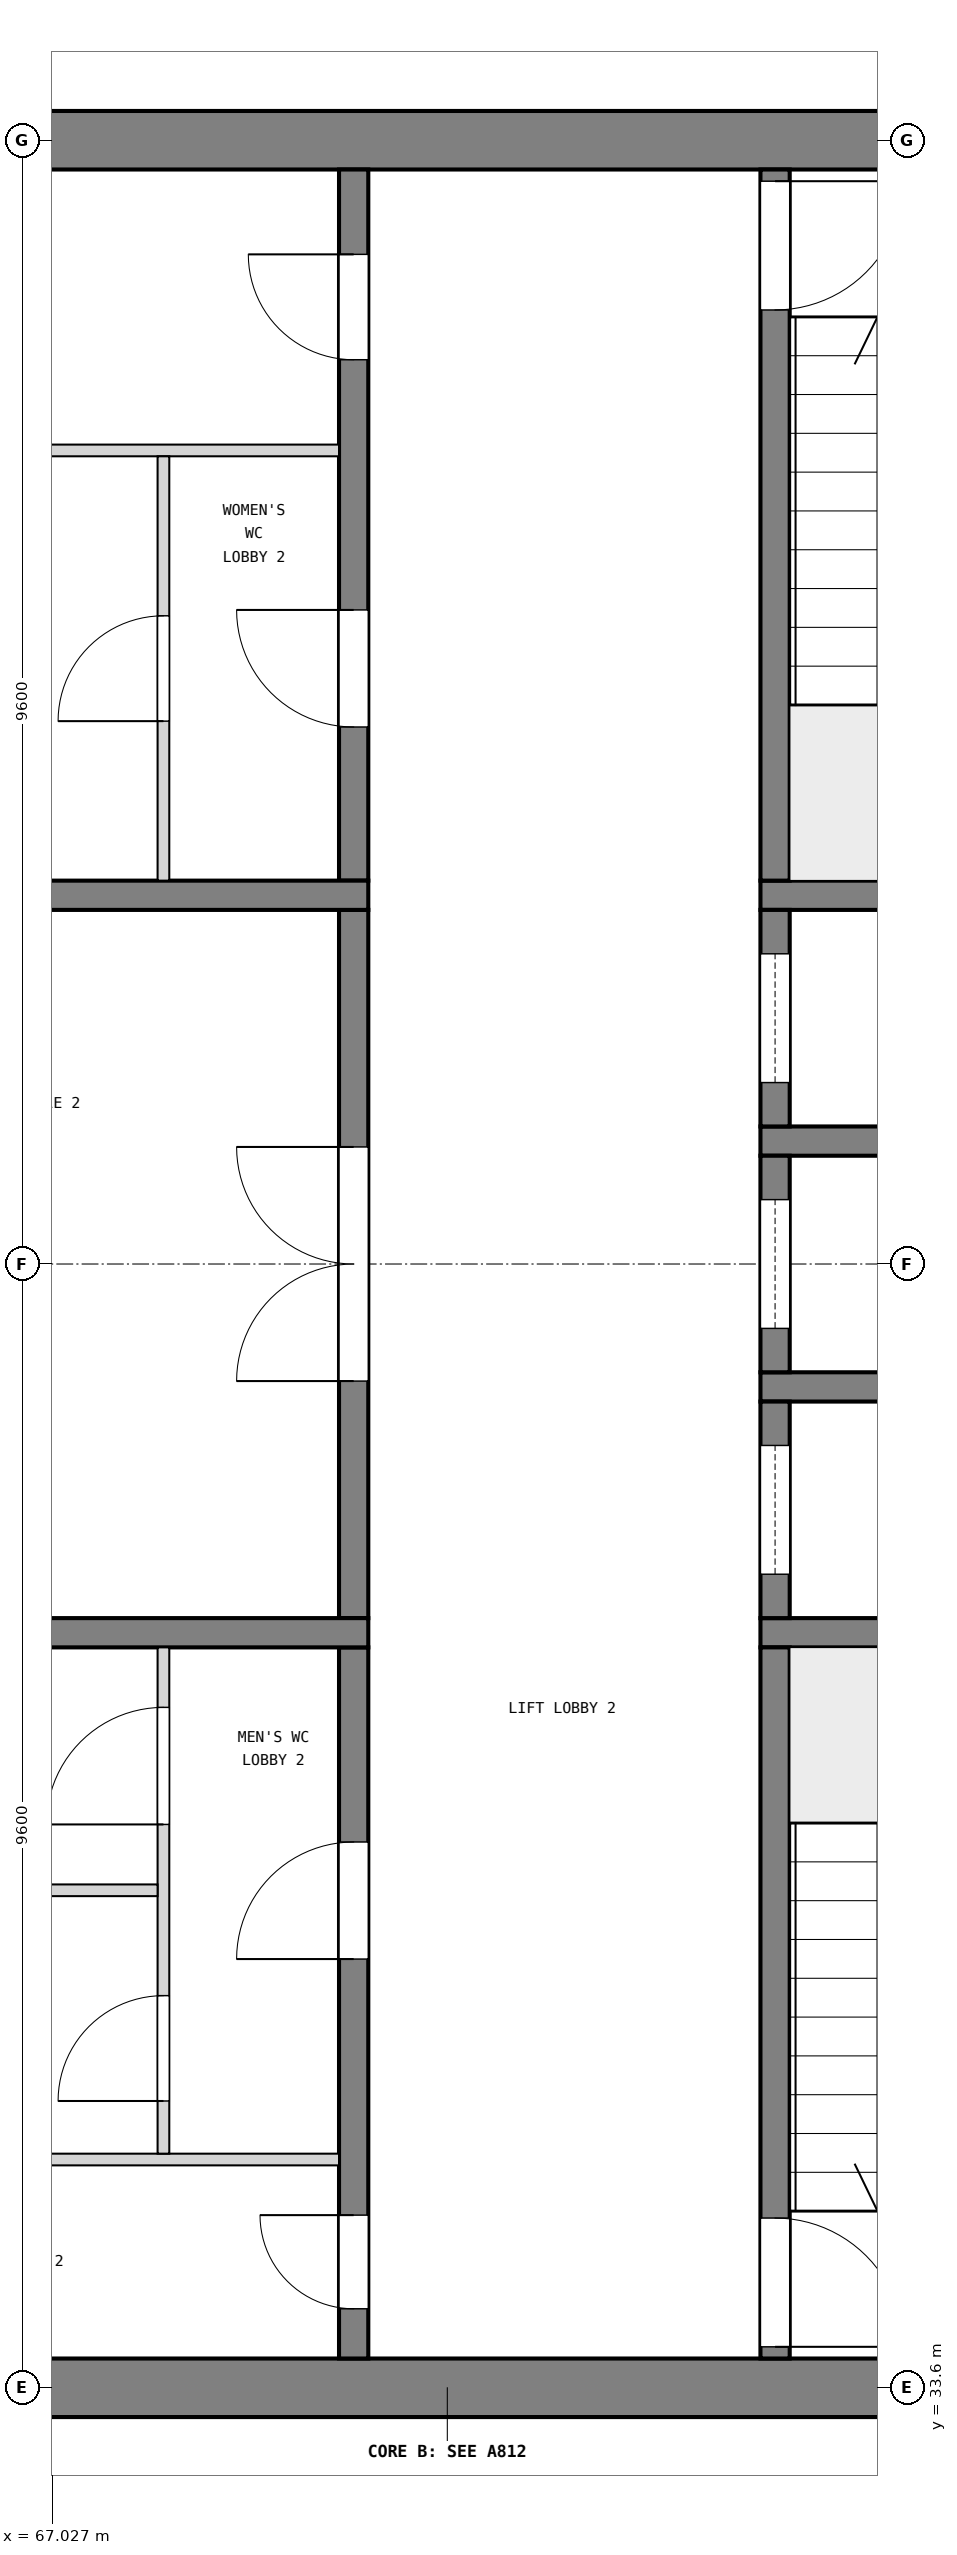
"""IFC4 building model, lengths in metres.
Left out: names, types, materials, properties, quantities, classifications, styles, units other than length and angle.
Written with IfcOpenShell. Run it as: python <this file> out.ifc"""

import sys

from ifc_helpers import new_model, si_unit, direction, frame, frame_2d, origin, place, context, subcontext, project, spatial, rectangle, extrude, element, fill, save


model = new_model("IFC4")
c1 = context("Model", 3, precision=1e-05, world=origin(), true_north=direction((0.0, 1.0)))
c2 = subcontext(c1, "Body", "Model", "MODEL_VIEW")
j1 = project(units=[si_unit("LENGTHUNIT", "METRE"), si_unit("PLANEANGLEUNIT", "RADIAN")], contexts=[c1])
p1 = place(None, origin())
s1 = spatial("IfcSite", under=j1, at=p1, CompositionType="ELEMENT")
p2 = place(p1, origin())
s2 = spatial("IfcBuilding", under=s1, at=p2, CompositionType="ELEMENT")
p3 = place(p2, frame((0.0, 0.0, 40.5)))
s3 = spatial("IfcBuildingStorey", under=s2, at=p3, CompositionType="ELEMENT", Elevation=40.5)
p4 = place(p3, frame((63.75, 52.8, 0.0), z_axis=(0.0, 0.0, 1.0), x_axis=(1.0, 0.0, 0.0)))
e1 = element("IfcWall", 1, at=p4, inside=s3, PredefinedType="SHEAR", context=c2, shape_type="SweptSolid", body=[
    extrude(rectangle(XDim=13.3, YDim=0.5, at=frame_2d((6.65, 0.0))), origin(), (0.0, 0.0, 1.0), 3.9),
])
p5 = place(p4, frame((11.05, 0.0, 1.0)))
e2 = element("IfcOpeningElement", 2, at=p5, cuts=e1, PredefinedType="OPENING", context=c2, shape_type="SweptSolid", body=[
    extrude(rectangle(XDim=0.4, YDim=2.0, at=frame_2d((0.2, 1.0))), frame((0.0, 0.26, 0.0), z_axis=(0.0, -1.0, 0.0), x_axis=(1.0, 0.0, 0.0)), (0.0, 0.0, 1.0), 0.52),
])
p6 = place(p3, frame((63.75, 33.6, 0.0), z_axis=(0.0, 0.0, 1.0), x_axis=(1.0, 0.0, 0.0)))
e3 = element("IfcWall", 3, at=p6, inside=s3, PredefinedType="SHEAR", context=c2, shape_type="SweptSolid", body=[
    extrude(rectangle(XDim=13.3, YDim=0.5, at=frame_2d((6.65, 0.0))), origin(), (0.0, 0.0, 1.0), 3.9),
])
p7 = place(p6, frame((11.05, 0.0, 1.0)))
e4 = element("IfcOpeningElement", 4, at=p7, cuts=e3, PredefinedType="OPENING", context=c2, shape_type="SweptSolid", body=[
    extrude(rectangle(XDim=0.4, YDim=2.0, at=frame_2d((0.2, 1.0))), frame((0.0, 0.26, 0.0), z_axis=(0.0, -1.0, 0.0), x_axis=(1.0, 0.0, 0.0)), (0.0, 0.0, 1.0), 0.52),
])
for number, where, z_axis, x_axis in (
    (5, (76.55, 40.05, 0.0), (0.0, 0.0, 1.0), (-1.0, 0.0, 0.0)),
    (6, (76.55, 42.15, 0.0), (0.0, 0.0, 1.0), (-1.0, 0.0, 0.0)),
    (7, (76.55, 44.25, 0.0), (0.0, 0.0, 1.0), (-1.0, 0.0, 0.0)),
    (8, (76.55, 46.35, 0.0), (0.0, 0.0, 1.0), (-1.0, 0.0, 0.0)),
):
    element("IfcWall", number, at=place(p3, frame(where, z_axis=z_axis, x_axis=x_axis)), inside=s3, PredefinedType="SOLIDWALL", context=c2, shape_type="SweptSolid", body=[
        extrude(rectangle(XDim=3.475, YDim=0.25, at=frame_2d((1.738, 0.0))), origin(), (0.0, 0.0, 1.0), 3.6),
    ])
p8 = place(p3, frame((73.2, 33.85, 0.0), z_axis=(0.0, 0.0, 1.0), x_axis=(0.0, 1.0, 0.0)))
e9 = element("IfcWall", 9, at=p8, inside=s3, PredefinedType="SOLIDWALL", context=c2, shape_type="SweptSolid", body=[
    extrude(rectangle(XDim=6.075, YDim=0.25, at=frame_2d((3.038, 0.0))), origin(), (0.0, 0.0, 1.0), 3.6),
])
p9 = place(p8, frame((0.1, 0.0, 0.0)))
e10 = element("IfcOpeningElement", 10, at=p9, cuts=e9, PredefinedType="OPENING", context=c2, shape_type="SweptSolid", body=[
    extrude(rectangle(XDim=1.1, YDim=2.1, at=frame_2d((0.55, 1.05))), frame((0.0, 0.135, 0.0), z_axis=(0.0, -1.0, 0.0), x_axis=(1.0, 0.0, 0.0)), (0.0, 0.0, 1.0), 0.27),
])
p10 = place(p3, frame((73.2, 40.175, 0.0), z_axis=(0.0, 0.0, 1.0), x_axis=(0.0, 1.0, 0.0)))
e11 = element("IfcWall", 11, at=p10, inside=s3, PredefinedType="SOLIDWALL", context=c2, shape_type="SweptSolid", body=[
    extrude(rectangle(XDim=1.85, YDim=0.25, at=frame_2d((0.925, 0.0))), origin(), (0.0, 0.0, 1.0), 3.6),
])
p11 = place(p10, frame((0.375, 0.0, 0.0)))
e12 = element("IfcOpeningElement", 12, at=p11, cuts=e11, PredefinedType="OPENING", context=c2, shape_type="SweptSolid", body=[
    extrude(rectangle(XDim=1.1, YDim=2.1, at=frame_2d((0.55, 1.05))), frame((0.0, 0.135, 0.0), z_axis=(0.0, -1.0, 0.0), x_axis=(1.0, 0.0, 0.0)), (0.0, 0.0, 1.0), 0.27),
])
p12 = place(p3, frame((73.2, 42.275, 0.0), z_axis=(0.0, 0.0, 1.0), x_axis=(0.0, 1.0, 0.0)))
e13 = element("IfcWall", 13, at=p12, inside=s3, PredefinedType="SOLIDWALL", context=c2, shape_type="SweptSolid", body=[
    extrude(rectangle(XDim=1.85, YDim=0.25, at=frame_2d((0.925, 0.0))), origin(), (0.0, 0.0, 1.0), 3.6),
])
p13 = place(p12, frame((0.375, 0.0, 0.0)))
e14 = element("IfcOpeningElement", 14, at=p13, cuts=e13, PredefinedType="OPENING", context=c2, shape_type="SweptSolid", body=[
    extrude(rectangle(XDim=1.1, YDim=2.1, at=frame_2d((0.55, 1.05))), frame((0.0, 0.135, 0.0), z_axis=(0.0, -1.0, 0.0), x_axis=(1.0, 0.0, 0.0)), (0.0, 0.0, 1.0), 0.27),
])
p14 = place(p3, frame((73.2, 44.375, 0.0), z_axis=(0.0, 0.0, 1.0), x_axis=(0.0, 1.0, 0.0)))
e15 = element("IfcWall", 15, at=p14, inside=s3, PredefinedType="SOLIDWALL", context=c2, shape_type="SweptSolid", body=[
    extrude(rectangle(XDim=1.85, YDim=0.25, at=frame_2d((0.925, 0.0))), origin(), (0.0, 0.0, 1.0), 3.6),
])
p15 = place(p14, frame((0.375, 0.0, 0.0)))
e16 = element("IfcOpeningElement", 16, at=p15, cuts=e15, PredefinedType="OPENING", context=c2, shape_type="SweptSolid", body=[
    extrude(rectangle(XDim=1.1, YDim=2.1, at=frame_2d((0.55, 1.05))), frame((0.0, 0.135, 0.0), z_axis=(0.0, -1.0, 0.0), x_axis=(1.0, 0.0, 0.0)), (0.0, 0.0, 1.0), 0.27),
])
p16 = place(p3, frame((73.2, 46.475, 0.0), z_axis=(0.0, 0.0, 1.0), x_axis=(0.0, 1.0, 0.0)))
e17 = element("IfcWall", 17, at=p16, inside=s3, PredefinedType="SOLIDWALL", context=c2, shape_type="SweptSolid", body=[
    extrude(rectangle(XDim=6.075, YDim=0.25, at=frame_2d((3.038, 0.0))), origin(), (0.0, 0.0, 1.0), 3.6),
])
p17 = place(p16, frame((4.875, 0.0, 0.0)))
e18 = element("IfcOpeningElement", 18, at=p17, cuts=e17, PredefinedType="OPENING", context=c2, shape_type="SweptSolid", body=[
    extrude(rectangle(XDim=1.1, YDim=2.1, at=frame_2d((0.55, 1.05))), frame((0.0, 0.135, 0.0), z_axis=(0.0, -1.0, 0.0), x_axis=(1.0, 0.0, 0.0)), (0.0, 0.0, 1.0), 0.27),
])
p18 = place(p3, frame((69.6, 33.85, 0.0), z_axis=(0.0, 0.0, 1.0), x_axis=(0.0, 1.0, 0.0)))
e19 = element("IfcWall", 19, at=p18, inside=s3, PredefinedType="SOLIDWALL", context=c2, shape_type="SweptSolid", body=[
    extrude(rectangle(XDim=6.075, YDim=0.25, at=frame_2d((3.038, 0.0))), origin(), (0.0, 0.0, 1.0), 3.6),
])
p19 = place(p18, frame((0.425, 0.0, 0.0)))
e20 = element("IfcOpeningElement", 20, at=p19, cuts=e19, PredefinedType="OPENING", context=c2, shape_type="SweptSolid", body=[
    extrude(rectangle(XDim=0.8, YDim=2.1, at=frame_2d((0.4, 1.05))), frame((0.0, 0.135, 0.0), z_axis=(0.0, -1.0, 0.0), x_axis=(1.0, 0.0, 0.0)), (0.0, 0.0, 1.0), 0.27),
])
p20 = place(p18, frame((3.413, 0.0, 0.0)))
e21 = element("IfcOpeningElement", 21, at=p20, cuts=e19, PredefinedType="OPENING", context=c2, shape_type="SweptSolid", body=[
    extrude(rectangle(XDim=1.0, YDim=2.1, at=frame_2d((0.5, 1.05))), frame((0.0, 0.135, 0.0), z_axis=(0.0, -1.0, 0.0), x_axis=(1.0, 0.0, 0.0)), (0.0, 0.0, 1.0), 0.27),
])
p21 = place(p3, frame((69.6, 40.175, 0.0), z_axis=(0.0, 0.0, 1.0), x_axis=(0.0, 1.0, 0.0)))
e22 = element("IfcWall", 22, at=p21, inside=s3, PredefinedType="SOLIDWALL", context=c2, shape_type="SweptSolid", body=[
    extrude(rectangle(XDim=6.05, YDim=0.25, at=frame_2d((3.025, 0.0))), origin(), (0.0, 0.0, 1.0), 3.6),
])
p22 = place(p21, frame((2.025, 0.0, 0.0)))
e23 = element("IfcOpeningElement", 23, at=p22, cuts=e22, PredefinedType="OPENING", context=c2, shape_type="SweptSolid", body=[
    extrude(rectangle(XDim=2.0, YDim=2.1, at=frame_2d((1.0, 1.05))), frame((0.0, 0.135, 0.0), z_axis=(0.0, -1.0, 0.0), x_axis=(1.0, 0.0, 0.0)), (0.0, 0.0, 1.0), 0.27),
])
p23 = place(p3, frame((69.6, 46.475, 0.0), z_axis=(0.0, 0.0, 1.0), x_axis=(0.0, 1.0, 0.0)))
e24 = element("IfcWall", 24, at=p23, inside=s3, PredefinedType="SOLIDWALL", context=c2, shape_type="SweptSolid", body=[
    extrude(rectangle(XDim=6.075, YDim=0.25, at=frame_2d((3.038, 0.0))), origin(), (0.0, 0.0, 1.0), 3.6),
])
p24 = place(p23, frame((1.312, 0.0, 0.0)))
e25 = element("IfcOpeningElement", 25, at=p24, cuts=e24, PredefinedType="OPENING", context=c2, shape_type="SweptSolid", body=[
    extrude(rectangle(XDim=1.0, YDim=2.1, at=frame_2d((0.5, 1.05))), frame((0.0, 0.135, 0.0), z_axis=(0.0, -1.0, 0.0), x_axis=(1.0, 0.0, 0.0)), (0.0, 0.0, 1.0), 0.27),
])
p25 = place(p23, frame((4.45, 0.0, 0.0)))
e26 = element("IfcOpeningElement", 26, at=p25, cuts=e24, PredefinedType="OPENING", context=c2, shape_type="SweptSolid", body=[
    extrude(rectangle(XDim=0.9, YDim=2.1, at=frame_2d((0.45, 1.05))), frame((0.0, 0.135, 0.0), z_axis=(0.0, -1.0, 0.0), x_axis=(1.0, 0.0, 0.0)), (0.0, 0.0, 1.0), 0.27),
])
for number, where, z_axis, x_axis in (
    (27, (69.725, 40.05, 0.0), (0.0, 0.0, 1.0), (-1.0, 0.0, 0.0)),
    (28, (69.725, 46.35, 0.0), (0.0, 0.0, 1.0), (-1.0, 0.0, 0.0)),
):
    element("IfcWall", number, at=place(p3, frame(where, z_axis=z_axis, x_axis=x_axis)), inside=s3, PredefinedType="SOLIDWALL", context=c2, shape_type="SweptSolid", body=[
        extrude(rectangle(XDim=5.475, YDim=0.25, at=frame_2d((2.738, 0.0))), origin(), (0.0, 0.0, 1.0), 3.6),
    ])
p26 = place(p3, frame((69.475, 35.55, 0.0), z_axis=(0.0, 0.0, 1.0), x_axis=(-1.0, 0.0, 0.0)))
e29 = element("IfcWall", 29, at=p26, inside=s3, PredefinedType="PARTITIONING", context=c2, shape_type="SweptSolid", body=[
    extrude(rectangle(XDim=5.225, YDim=0.1, at=frame_2d((2.613, 0.0))), origin(), (0.0, 0.0, 1.0), 3.6),
])
p27 = place(p3, frame((67.975, 35.6, 0.0), z_axis=(0.0, 0.0, 1.0), x_axis=(0.0, 1.0, 0.0)))
e30 = element("IfcWall", 30, at=p27, inside=s3, PredefinedType="PARTITIONING", context=c2, shape_type="SweptSolid", body=[
    extrude(rectangle(XDim=4.325, YDim=0.1, at=frame_2d((2.163, 0.0))), origin(), (0.0, 0.0, 1.0), 3.6),
])
p28 = place(p27, frame((0.45, 0.0, 0.0)))
e31 = element("IfcOpeningElement", 31, at=p28, cuts=e30, PredefinedType="OPENING", context=c2, shape_type="SweptSolid", body=[
    extrude(rectangle(XDim=0.9, YDim=2.1, at=frame_2d((0.45, 1.05))), frame((0.0, 0.06, 0.0), z_axis=(0.0, -1.0, 0.0), x_axis=(1.0, 0.0, 0.0)), (0.0, 0.0, 1.0), 0.12),
])
p29 = place(p27, frame((2.812, 0.0, 0.0)))
e32 = element("IfcOpeningElement", 32, at=p29, cuts=e30, PredefinedType="OPENING", context=c2, shape_type="SweptSolid", body=[
    extrude(rectangle(XDim=1.0, YDim=2.1, at=frame_2d((0.5, 1.05))), frame((0.0, 0.06, 0.0), z_axis=(0.0, -1.0, 0.0), x_axis=(1.0, 0.0, 0.0)), (0.0, 0.0, 1.0), 0.12),
])
p30 = place(p3, frame((67.925, 37.85, 0.0), z_axis=(0.0, 0.0, 1.0), x_axis=(-1.0, 0.0, 0.0)))
e33 = element("IfcWall", 33, at=p30, inside=s3, PredefinedType="PARTITIONING", context=c2, shape_type="SweptSolid", body=[
    extrude(rectangle(XDim=3.675, YDim=0.1, at=frame_2d((1.837, 0.0))), origin(), (0.0, 0.0, 1.0), 3.6),
])
p31 = place(p3, frame((69.475, 50.15, 0.0), z_axis=(0.0, 0.0, 1.0), x_axis=(-1.0, 0.0, 0.0)))
e34 = element("IfcWall", 34, at=p31, inside=s3, PredefinedType="PARTITIONING", context=c2, shape_type="SweptSolid", body=[
    extrude(rectangle(XDim=5.225, YDim=0.1, at=frame_2d((2.613, 0.0))), origin(), (0.0, 0.0, 1.0), 3.6),
])
p32 = place(p3, frame((67.975, 46.475, 0.0), z_axis=(0.0, 0.0, 1.0), x_axis=(0.0, 1.0, 0.0)))
e35 = element("IfcWall", 35, at=p32, inside=s3, PredefinedType="PARTITIONING", context=c2, shape_type="SweptSolid", body=[
    extrude(rectangle(XDim=3.625, YDim=0.1, at=frame_2d((1.812, 0.0))), origin(), (0.0, 0.0, 1.0), 3.6),
])
p33 = place(p32, frame((1.363, 0.0, 0.0)))
e36 = element("IfcOpeningElement", 36, at=p33, cuts=e35, PredefinedType="OPENING", context=c2, shape_type="SweptSolid", body=[
    extrude(rectangle(XDim=0.9, YDim=2.1, at=frame_2d((0.45, 1.05))), frame((0.0, 0.06, 0.0), z_axis=(0.0, -1.0, 0.0), x_axis=(1.0, 0.0, 0.0)), (0.0, 0.0, 1.0), 0.12),
])
p34 = place(p9, frame((1.1, 0.0, 0.0), z_axis=(0.0, 0.0, 1.0), x_axis=(-1.0, 0.0, 0.0)))
e37 = element("IfcDoor", 37, at=p34, inside=s3, OperationType="SINGLE_SWING_RIGHT", PredefinedType="DOOR", context=c2, shape_type="SweptSolid", body=[
    extrude(rectangle(XDim=1.1, YDim=2.1, at=frame_2d((0.55, 1.05))), frame((0.0, 0.025, 0.0), z_axis=(0.0, -1.0, 0.0), x_axis=(1.0, 0.0, 0.0)), (0.0, 0.0, 1.0), 0.05),
])
fill(e10, e37)
p35 = place(p17, frame((1.1, 0.0, 0.0), z_axis=(0.0, 0.0, 1.0), x_axis=(-1.0, 0.0, 0.0)))
e38 = element("IfcDoor", 38, at=p35, inside=s3, OperationType="SINGLE_SWING_LEFT", PredefinedType="DOOR", context=c2, shape_type="SweptSolid", body=[
    extrude(rectangle(XDim=1.1, YDim=2.1, at=frame_2d((0.55, 1.05))), frame((0.0, 0.025, 0.0), z_axis=(0.0, -1.0, 0.0), x_axis=(1.0, 0.0, 0.0)), (0.0, 0.0, 1.0), 0.05),
])
fill(e18, e38)
p36 = place(p11, origin())
e39 = element("IfcDoor", 39, at=p36, inside=s3, OperationType="SLIDING_TO_LEFT", PredefinedType="DOOR", context=c2, shape_type="SweptSolid", body=[
    extrude(rectangle(XDim=1.1, YDim=2.1, at=frame_2d((0.55, 1.05))), frame((0.0, 0.025, 0.0), z_axis=(0.0, -1.0, 0.0), x_axis=(1.0, 0.0, 0.0)), (0.0, 0.0, 1.0), 0.05),
])
fill(e12, e39)
p37 = place(p13, origin())
e40 = element("IfcDoor", 40, at=p37, inside=s3, OperationType="SLIDING_TO_LEFT", PredefinedType="DOOR", context=c2, shape_type="SweptSolid", body=[
    extrude(rectangle(XDim=1.1, YDim=2.1, at=frame_2d((0.55, 1.05))), frame((0.0, 0.025, 0.0), z_axis=(0.0, -1.0, 0.0), x_axis=(1.0, 0.0, 0.0)), (0.0, 0.0, 1.0), 0.05),
])
fill(e14, e40)
p38 = place(p15, origin())
e41 = element("IfcDoor", 41, at=p38, inside=s3, OperationType="SLIDING_TO_LEFT", PredefinedType="DOOR", context=c2, shape_type="SweptSolid", body=[
    extrude(rectangle(XDim=1.1, YDim=2.1, at=frame_2d((0.55, 1.05))), frame((0.0, 0.025, 0.0), z_axis=(0.0, -1.0, 0.0), x_axis=(1.0, 0.0, 0.0)), (0.0, 0.0, 1.0), 0.05),
])
fill(e16, e41)
p39 = place(p22, origin())
e42 = element("IfcDoor", 42, at=p39, inside=s3, OperationType="DOUBLE_DOOR_SINGLE_SWING", PredefinedType="DOOR", context=c2, shape_type="SweptSolid", body=[
    extrude(rectangle(XDim=2.0, YDim=2.1, at=frame_2d((1.0, 1.05))), frame((0.0, 0.025, 0.0), z_axis=(0.0, -1.0, 0.0), x_axis=(1.0, 0.0, 0.0)), (0.0, 0.0, 1.0), 0.05),
])
fill(e23, e42)
p40 = place(p19, origin())
e43 = element("IfcDoor", 43, at=p40, inside=s3, OperationType="SINGLE_SWING_RIGHT", PredefinedType="DOOR", context=c2, shape_type="SweptSolid", body=[
    extrude(rectangle(XDim=0.8, YDim=2.1, at=frame_2d((0.4, 1.05))), frame((0.0, 0.025, 0.0), z_axis=(0.0, -1.0, 0.0), x_axis=(1.0, 0.0, 0.0)), (0.0, 0.0, 1.0), 0.05),
])
fill(e20, e43)
p41 = place(p20, origin())
e44 = element("IfcDoor", 44, at=p41, inside=s3, OperationType="SINGLE_SWING_LEFT", PredefinedType="DOOR", context=c2, shape_type="SweptSolid", body=[
    extrude(rectangle(XDim=1.0, YDim=2.1, at=frame_2d((0.5, 1.05))), frame((0.0, 0.025, 0.0), z_axis=(0.0, -1.0, 0.0), x_axis=(1.0, 0.0, 0.0)), (0.0, 0.0, 1.0), 0.05),
])
fill(e21, e44)
p42 = place(p28, origin())
e45 = element("IfcDoor", 45, at=p42, inside=s3, OperationType="SINGLE_SWING_LEFT", PredefinedType="DOOR", context=c2, shape_type="SweptSolid", body=[
    extrude(rectangle(XDim=0.9, YDim=2.1, at=frame_2d((0.45, 1.05))), frame((0.0, 0.025, 0.0), z_axis=(0.0, -1.0, 0.0), x_axis=(1.0, 0.0, 0.0)), (0.0, 0.0, 1.0), 0.05),
])
fill(e31, e45)
p43 = place(p29, origin())
e46 = element("IfcDoor", 46, at=p43, inside=s3, OperationType="SINGLE_SWING_LEFT", PredefinedType="DOOR", context=c2, shape_type="SweptSolid", body=[
    extrude(rectangle(XDim=1.0, YDim=2.1, at=frame_2d((0.5, 1.05))), frame((0.0, 0.025, 0.0), z_axis=(0.0, -1.0, 0.0), x_axis=(1.0, 0.0, 0.0)), (0.0, 0.0, 1.0), 0.05),
])
fill(e32, e46)
p44 = place(p24, origin())
e47 = element("IfcDoor", 47, at=p44, inside=s3, OperationType="SINGLE_SWING_RIGHT", PredefinedType="DOOR", context=c2, shape_type="SweptSolid", body=[
    extrude(rectangle(XDim=1.0, YDim=2.1, at=frame_2d((0.5, 1.05))), frame((0.0, 0.025, 0.0), z_axis=(0.0, -1.0, 0.0), x_axis=(1.0, 0.0, 0.0)), (0.0, 0.0, 1.0), 0.05),
])
fill(e25, e47)
p45 = place(p33, origin())
e48 = element("IfcDoor", 48, at=p45, inside=s3, OperationType="SINGLE_SWING_LEFT", PredefinedType="DOOR", context=c2, shape_type="SweptSolid", body=[
    extrude(rectangle(XDim=0.9, YDim=2.1, at=frame_2d((0.45, 1.05))), frame((0.0, 0.025, 0.0), z_axis=(0.0, -1.0, 0.0), x_axis=(1.0, 0.0, 0.0)), (0.0, 0.0, 1.0), 0.05),
])
fill(e36, e48)
p46 = place(p25, origin())
e49 = element("IfcDoor", 49, at=p46, inside=s3, OperationType="SINGLE_SWING_RIGHT", PredefinedType="DOOR", context=c2, shape_type="SweptSolid", body=[
    extrude(rectangle(XDim=0.9, YDim=2.1, at=frame_2d((0.45, 1.05))), frame((0.0, 0.025, 0.0), z_axis=(0.0, -1.0, 0.0), x_axis=(1.0, 0.0, 0.0)), (0.0, 0.0, 1.0), 0.05),
])
fill(e26, e49)
save(model, sys.argv[1])
